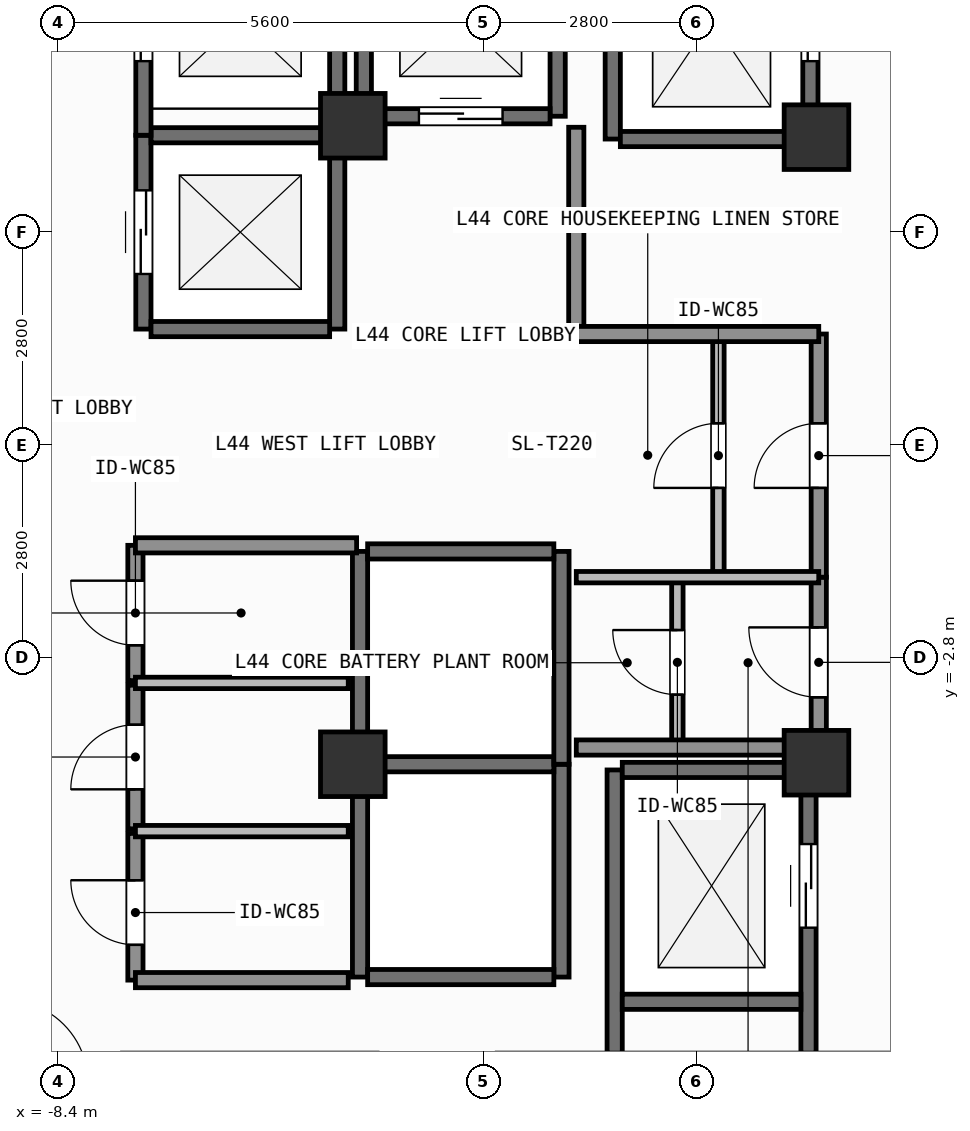
"""IFC4 building model, lengths in metres.
Left out: names, types, materials, properties, quantities, classifications, styles, units other than length and angle.
Written with IfcOpenShell. Run it as: python <this file> out.ifc"""

import sys

from ifc_helpers import new_model, si_unit, direction, frame, frame_2d, origin, origin_2d, place, context, subcontext, project, spatial, rectangle, extrude, element, fill, save


model = new_model("IFC4")
c1 = context("Model", 3, precision=1e-05, world=origin(), true_north=direction((0.0, 1.0)))
c2 = subcontext(c1, "Body", "Model", "MODEL_VIEW")
j1 = project(units=[si_unit("LENGTHUNIT", "METRE"), si_unit("PLANEANGLEUNIT", "RADIAN")], contexts=[c1])
p1 = place(None, origin())
s1 = spatial("IfcSite", under=j1, at=p1, CompositionType="ELEMENT")
p2 = place(p1, origin())
s2 = spatial("IfcBuilding", under=s1, at=p2, CompositionType="ELEMENT")
p3 = place(p2, frame((0.0, 0.0, 179.7)))
s3 = spatial("IfcBuildingStorey", under=s2, at=p3, CompositionType="ELEMENT", Elevation=179.7)
for number, where, z_axis, x_axis in (
    (1, (-4.52, -4.2, 0.0), (0.0, 0.0, 1.0), (1.0, 0.0, 0.0)),
    (2, (1.58, -4.18, 0.0), (0.0, 0.0, 1.0), (1.0, 0.0, 0.0)),
    (3, (1.58, 4.05, 0.0), (0.0, 0.0, 1.0), (1.0, 0.0, 0.0)),
    (4, (-4.52, 4.2, 0.0), (0.0, 0.0, 1.0), (1.0, 0.0, 0.0)),
):
    element("IfcColumn", number, at=place(p3, frame(where, z_axis=z_axis, x_axis=x_axis)), inside=s3, PredefinedType="COLUMN", context=c2, shape_type="SweptSolid", body=[
        extrude(rectangle(XDim=0.85, YDim=0.85, at=origin_2d()), origin(), (0.0, 0.0, 1.0), 3.9),
    ])
p4 = place(p3, frame((-7.275, 1.525, 0.0), z_axis=(0.0, 0.0, 1.0), x_axis=(0.0, 1.0, 0.0)))
e5 = element("IfcWall", 5, at=p4, inside=s3, PredefinedType="SHEAR", context=c2, shape_type="SweptSolid", body=[
    extrude(rectangle(XDim=2.55, YDim=0.2, at=frame_2d((1.275, 0.0))), origin(), (0.0, 0.0, 1.0), 3.68),
])
p5 = place(p4, frame((0.725, 0.0, 0.0)))
e6 = element("IfcOpeningElement", 6, at=p5, cuts=e5, PredefinedType="OPENING", context=c2, shape_type="SweptSolid", body=[
    extrude(rectangle(XDim=1.1, YDim=2.2, at=frame_2d((0.55, 1.1))), frame((0.0, 0.11, 0.0), z_axis=(0.0, -1.0, 0.0), x_axis=(1.0, 0.0, 0.0)), (0.0, 0.0, 1.0), 0.22),
])
p6 = place(p3, frame((-4.725, 1.525, 0.0), z_axis=(0.0, 0.0, 1.0), x_axis=(0.0, 1.0, 0.0)))
e7 = element("IfcWall", 7, at=p6, inside=s3, PredefinedType="SHEAR", context=c2, shape_type="SweptSolid", body=[
    extrude(rectangle(XDim=2.55, YDim=0.2, at=frame_2d((1.275, 0.0))), origin(), (0.0, 0.0, 1.0), 3.68),
])
for number, where, z_axis, x_axis in (
    (8, (-7.175, 1.525, 0.0), (0.0, 0.0, 1.0), (1.0, 0.0, 0.0)),
    (9, (-7.175, 4.075, 0.0), (0.0, 0.0, 1.0), (1.0, 0.0, 0.0)),
):
    element("IfcWall", number, at=place(p3, frame(where, z_axis=z_axis, x_axis=x_axis)), inside=s3, PredefinedType="SHEAR", context=c2, shape_type="SweptSolid", body=[
        extrude(rectangle(XDim=2.35, YDim=0.2, at=frame_2d((1.175, 0.0))), origin(), (0.0, 0.0, 1.0), 3.68),
    ])
p7 = place(p3, frame((-7.275, 4.075, 0.0), z_axis=(0.0, 0.0, 1.0), x_axis=(0.0, 1.0, 0.0)))
e10 = element("IfcWall", 10, at=p7, inside=s3, PredefinedType="SHEAR", context=c2, shape_type="SweptSolid", body=[
    extrude(rectangle(XDim=2.8, YDim=0.2, at=frame_2d((1.4, 0.0))), origin(), (0.0, 0.0, 1.0), 3.68),
])
p8 = place(p7, frame((0.975, 0.0, 0.0)))
e11 = element("IfcOpeningElement", 11, at=p8, cuts=e10, PredefinedType="OPENING", context=c2, shape_type="SweptSolid", body=[
    extrude(rectangle(XDim=1.1, YDim=2.2, at=frame_2d((0.55, 1.1))), frame((0.0, 0.11, 0.0), z_axis=(0.0, -1.0, 0.0), x_axis=(1.0, 0.0, 0.0)), (0.0, 0.0, 1.0), 0.22),
])
p9 = place(p3, frame((-4.725, 4.075, 0.0), z_axis=(0.0, 0.0, 1.0), x_axis=(0.0, 1.0, 0.0)))
e12 = element("IfcWall", 12, at=p9, inside=s3, PredefinedType="SHEAR", context=c2, shape_type="SweptSolid", body=[
    extrude(rectangle(XDim=2.8, YDim=0.2, at=frame_2d((1.4, 0.0))), origin(), (0.0, 0.0, 1.0), 3.68),
])
for number, where, z_axis, x_axis in (
    (13, (-4.375, 4.325, 0.0), (0.0, 0.0, 1.0), (0.0, 1.0, 0.0)),
    (14, (-1.825, 4.325, 0.0), (0.0, 0.0, 1.0), (0.0, 1.0, 0.0)),
):
    element("IfcWall", number, at=place(p3, frame(where, z_axis=z_axis, x_axis=x_axis)), inside=s3, PredefinedType="SHEAR", context=c2, shape_type="SweptSolid", body=[
        extrude(rectangle(XDim=2.55, YDim=0.2, at=frame_2d((1.275, 0.0))), origin(), (0.0, 0.0, 1.0), 3.68),
    ])
p10 = place(p3, frame((-4.275, 4.325, 0.0), z_axis=(0.0, 0.0, 1.0), x_axis=(1.0, 0.0, 0.0)))
e15 = element("IfcWall", 15, at=p10, inside=s3, PredefinedType="SHEAR", context=c2, shape_type="SweptSolid", body=[
    extrude(rectangle(XDim=2.35, YDim=0.2, at=frame_2d((1.175, 0.0))), origin(), (0.0, 0.0, 1.0), 3.68),
])
p11 = place(p10, frame((0.625, 0.0, 0.0)))
e16 = element("IfcOpeningElement", 16, at=p11, cuts=e15, PredefinedType="OPENING", context=c2, shape_type="SweptSolid", body=[
    extrude(rectangle(XDim=1.1, YDim=2.2, at=frame_2d((0.55, 1.1))), frame((0.0, 0.11, 0.0), z_axis=(0.0, -1.0, 0.0), x_axis=(1.0, 0.0, 0.0)), (0.0, 0.0, 1.0), 0.22),
])
for number, where, z_axis, x_axis in (
    (17, (-4.425, -7.0, 0.0), (0.0, 0.0, 1.0), (0.0, 1.0, 0.0)),
    (18, (-1.775, -7.0, 0.0), (0.0, 0.0, 1.0), (0.0, 1.0, 0.0)),
):
    element("IfcWall", number, at=place(p3, frame(where, z_axis=z_axis, x_axis=x_axis)), inside=s3, PredefinedType="SHEAR", context=c2, shape_type="SweptSolid", body=[
        extrude(rectangle(XDim=2.8, YDim=0.2, at=frame_2d((1.4, 0.0))), origin(), (0.0, 0.0, 1.0), 3.68),
    ])
for number, where, z_axis, x_axis in (
    (19, (-4.325, -7.0, 0.0), (0.0, 0.0, 1.0), (1.0, 0.0, 0.0)),
    (20, (-4.325, -4.2, 0.0), (0.0, 0.0, 1.0), (1.0, 0.0, 0.0)),
):
    element("IfcWall", number, at=place(p3, frame(where, z_axis=z_axis, x_axis=x_axis)), inside=s3, PredefinedType="SHEAR", context=c2, shape_type="SweptSolid", body=[
        extrude(rectangle(XDim=2.45, YDim=0.2, at=frame_2d((1.225, 0.0))), origin(), (0.0, 0.0, 1.0), 3.68),
    ])
for number, where, z_axis, x_axis in (
    (21, (-4.425, -4.2, 0.0), (0.0, 0.0, 1.0), (0.0, 1.0, 0.0)),
    (22, (-1.775, -4.2, 0.0), (0.0, 0.0, 1.0), (0.0, 1.0, 0.0)),
):
    element("IfcWall", number, at=place(p3, frame(where, z_axis=z_axis, x_axis=x_axis)), inside=s3, PredefinedType="SHEAR", context=c2, shape_type="SweptSolid", body=[
        extrude(rectangle(XDim=2.8, YDim=0.2, at=frame_2d((1.4, 0.0))), origin(), (0.0, 0.0, 1.0), 3.68),
    ])
p12 = place(p3, frame((-4.325, -1.4, 0.0), z_axis=(0.0, 0.0, 1.0), x_axis=(1.0, 0.0, 0.0)))
e23 = element("IfcWall", 23, at=p12, inside=s3, PredefinedType="SHEAR", context=c2, shape_type="SweptSolid", body=[
    extrude(rectangle(XDim=2.45, YDim=0.2, at=frame_2d((1.225, 0.0))), origin(), (0.0, 0.0, 1.0), 3.68),
])
p13 = place(p3, frame((-1.1, 4.025, 0.0), z_axis=(0.0, 0.0, 1.0), x_axis=(0.0, 1.0, 0.0)))
e24 = element("IfcWall", 24, at=p13, inside=s3, PredefinedType="SHEAR", context=c2, shape_type="SweptSolid", body=[
    extrude(rectangle(XDim=3.15, YDim=0.2, at=frame_2d((1.575, 0.0))), origin(), (0.0, 0.0, 1.0), 3.68),
])
p14 = place(p3, frame((1.5, 4.025, 0.0), z_axis=(0.0, 0.0, 1.0), x_axis=(0.0, 1.0, 0.0)))
e25 = element("IfcWall", 25, at=p14, inside=s3, PredefinedType="SHEAR", context=c2, shape_type="SweptSolid", body=[
    extrude(rectangle(XDim=3.15, YDim=0.2, at=frame_2d((1.575, 0.0))), origin(), (0.0, 0.0, 1.0), 3.68),
])
p15 = place(p14, frame((1.025, 0.0, 0.0)))
e26 = element("IfcOpeningElement", 26, at=p15, cuts=e25, PredefinedType="OPENING", context=c2, shape_type="SweptSolid", body=[
    extrude(rectangle(XDim=1.1, YDim=2.2, at=frame_2d((0.55, 1.1))), frame((0.0, 0.11, 0.0), z_axis=(0.0, -1.0, 0.0), x_axis=(1.0, 0.0, 0.0)), (0.0, 0.0, 1.0), 0.22),
])
p16 = place(p3, frame((-1.0, 4.025, 0.0), z_axis=(0.0, 0.0, 1.0), x_axis=(1.0, 0.0, 0.0)))
e27 = element("IfcWall", 27, at=p16, inside=s3, PredefinedType="SHEAR", context=c2, shape_type="SweptSolid", body=[
    extrude(rectangle(XDim=2.4, YDim=0.2, at=frame_2d((1.2, 0.0))), origin(), (0.0, 0.0, 1.0), 3.68),
])
p17 = place(p3, frame((-1.075, -8.0, 0.0), z_axis=(0.0, 0.0, 1.0), x_axis=(0.0, 1.0, 0.0)))
e28 = element("IfcWall", 28, at=p17, inside=s3, PredefinedType="SHEAR", context=c2, shape_type="SweptSolid", body=[
    extrude(rectangle(XDim=3.725, YDim=0.2, at=frame_2d((1.863, 0.0))), origin(), (0.0, 0.0, 1.0), 3.68),
])
p18 = place(p3, frame((1.475, -8.0, 0.0), z_axis=(0.0, 0.0, 1.0), x_axis=(0.0, 1.0, 0.0)))
e29 = element("IfcWall", 29, at=p18, inside=s3, PredefinedType="SHEAR", context=c2, shape_type="SweptSolid", body=[
    extrude(rectangle(XDim=3.725, YDim=0.2, at=frame_2d((1.863, 0.0))), origin(), (0.0, 0.0, 1.0), 3.68),
])
p19 = place(p18, frame((1.65, 0.0, 0.0)))
e30 = element("IfcOpeningElement", 30, at=p19, cuts=e29, PredefinedType="OPENING", context=c2, shape_type="SweptSolid", body=[
    extrude(rectangle(XDim=1.1, YDim=2.2, at=frame_2d((0.55, 1.1))), frame((0.0, 0.11, 0.0), z_axis=(0.0, -1.0, 0.0), x_axis=(1.0, 0.0, 0.0)), (0.0, 0.0, 1.0), 0.22),
])
for number, where, z_axis, x_axis in (
    (31, (-0.975, -7.325, 0.0), (0.0, 0.0, 1.0), (1.0, 0.0, 0.0)),
    (32, (-0.975, -4.275, 0.0), (0.0, 0.0, 1.0), (1.0, 0.0, 0.0)),
):
    element("IfcWall", number, at=place(p3, frame(where, z_axis=z_axis, x_axis=x_axis)), inside=s3, PredefinedType="SHEAR", context=c2, shape_type="SweptSolid", body=[
        extrude(rectangle(XDim=2.35, YDim=0.2, at=frame_2d((1.175, 0.0))), origin(), (0.0, 0.0, 1.0), 3.68),
    ])
p20 = place(p3, frame((-0.25, -3.98, 0.0), z_axis=(0.0, 0.0, 1.0), x_axis=(0.0, 1.0, 0.0)))
e33 = element("IfcWall", 33, at=p20, inside=s3, PredefinedType="PARTITIONING", context=c2, shape_type="SweptSolid", body=[
    extrude(rectangle(XDim=2.241, YDim=0.15, at=frame_2d((1.121, 0.0))), origin(), (0.0, 0.0, 1.0), 3.68),
])
p21 = place(p20, frame((0.696, 0.0, 0.0)))
e34 = element("IfcOpeningElement", 34, at=p21, cuts=e33, PredefinedType="OPENING", context=c2, shape_type="SweptSolid", body=[
    extrude(rectangle(XDim=0.85, YDim=2.1, at=frame_2d((0.425, 1.05))), frame((0.0, 0.085, 0.0), z_axis=(0.0, -1.0, 0.0), x_axis=(1.0, 0.0, 0.0)), (0.0, 0.0, 1.0), 0.17),
])
p22 = place(p3, frame((0.29, -1.739, 0.0), z_axis=(0.0, 0.0, 1.0), x_axis=(0.0, 1.0, 0.0)))
e35 = element("IfcWall", 35, at=p22, inside=s3, PredefinedType="PARTITIONING", context=c2, shape_type="SweptSolid", body=[
    extrude(rectangle(XDim=3.199, YDim=0.15, at=frame_2d((1.6, 0.0))), origin(), (0.0, 0.0, 1.0), 3.68),
])
p23 = place(p22, frame((1.175, 0.0, 0.0)))
e36 = element("IfcOpeningElement", 36, at=p23, cuts=e35, PredefinedType="OPENING", context=c2, shape_type="SweptSolid", body=[
    extrude(rectangle(XDim=0.85, YDim=2.1, at=frame_2d((0.425, 1.05))), frame((0.0, 0.085, 0.0), z_axis=(0.0, -1.0, 0.0), x_axis=(1.0, 0.0, 0.0)), (0.0, 0.0, 1.0), 0.17),
])
p24 = place(p3, frame((1.61, -3.98, 0.0), z_axis=(0.0, 0.0, 1.0), x_axis=(0.0, 1.0, 0.0)))
e37 = element("IfcWall", 37, at=p24, inside=s3, PredefinedType="SOLIDWALL", context=c2, shape_type="SweptSolid", body=[
    extrude(rectangle(XDim=2.241, YDim=0.2, at=frame_2d((1.121, 0.0))), origin(), (0.0, 0.0, 1.0), 3.68),
])
p25 = place(p24, frame((0.66, 0.0, 0.0)))
e38 = element("IfcOpeningElement", 38, at=p25, cuts=e37, PredefinedType="OPENING", context=c2, shape_type="SweptSolid", body=[
    extrude(rectangle(XDim=0.92, YDim=2.1, at=frame_2d((0.46, 1.05))), frame((0.0, 0.11, 0.0), z_axis=(0.0, -1.0, 0.0), x_axis=(1.0, 0.0, 0.0)), (0.0, 0.0, 1.0), 0.22),
])
p26 = place(p3, frame((1.61, -1.739, 0.0), z_axis=(0.0, 0.0, 1.0), x_axis=(0.0, 1.0, 0.0)))
e39 = element("IfcWall", 39, at=p26, inside=s3, PredefinedType="SOLIDWALL", context=c2, shape_type="SweptSolid", body=[
    extrude(rectangle(XDim=3.199, YDim=0.2, at=frame_2d((1.6, 0.0))), origin(), (0.0, 0.0, 1.0), 3.68),
])
p27 = place(p26, frame((1.175, 0.0, 0.0)))
e40 = element("IfcOpeningElement", 40, at=p27, cuts=e39, PredefinedType="OPENING", context=c2, shape_type="SweptSolid", body=[
    extrude(rectangle(XDim=0.85, YDim=2.1, at=frame_2d((0.425, 1.05))), frame((0.0, 0.11, 0.0), z_axis=(0.0, -1.0, 0.0), x_axis=(1.0, 0.0, 0.0)), (0.0, 0.0, 1.0), 0.22),
])
p28 = place(p3, frame((-7.38, -7.04, 0.0), z_axis=(0.0, 0.0, 1.0), x_axis=(0.0, 1.0, 0.0)))
e41 = element("IfcWall", 41, at=p28, inside=s3, PredefinedType="SOLIDWALL", context=c2, shape_type="SweptSolid", body=[
    extrude(rectangle(XDim=1.93, YDim=0.2, at=frame_2d((0.965, 0.0))), origin(), (0.0, 0.0, 1.0), 3.68),
])
p29 = place(p28, frame((0.464, 0.0, 0.0)))
e42 = element("IfcOpeningElement", 42, at=p29, cuts=e41, PredefinedType="OPENING", context=c2, shape_type="SweptSolid", body=[
    extrude(rectangle(XDim=0.85, YDim=2.1, at=frame_2d((0.425, 1.05))), frame((0.0, 0.11, 0.0), z_axis=(0.0, -1.0, 0.0), x_axis=(1.0, 0.0, 0.0)), (0.0, 0.0, 1.0), 0.22),
])
p30 = place(p3, frame((-7.38, -5.05, 0.0), z_axis=(0.0, 0.0, 1.0), x_axis=(0.0, 1.0, 0.0)))
e43 = element("IfcWall", 43, at=p30, inside=s3, PredefinedType="SOLIDWALL", context=c2, shape_type="SweptSolid", body=[
    extrude(rectangle(XDim=1.89, YDim=0.2, at=frame_2d((0.945, 0.0))), origin(), (0.0, 0.0, 1.0), 3.68),
])
p31 = place(p30, frame((0.52, 0.0, 0.0)))
e44 = element("IfcOpeningElement", 44, at=p31, cuts=e43, PredefinedType="OPENING", context=c2, shape_type="SweptSolid", body=[
    extrude(rectangle(XDim=0.85, YDim=2.1, at=frame_2d((0.425, 1.05))), frame((0.0, 0.11, 0.0), z_axis=(0.0, -1.0, 0.0), x_axis=(1.0, 0.0, 0.0)), (0.0, 0.0, 1.0), 0.22),
])
p32 = place(p3, frame((-7.38, -3.1, 0.0), z_axis=(0.0, 0.0, 1.0), x_axis=(0.0, 1.0, 0.0)))
e45 = element("IfcWall", 45, at=p32, inside=s3, PredefinedType="SOLIDWALL", context=c2, shape_type="SweptSolid", body=[
    extrude(rectangle(XDim=1.78, YDim=0.2, at=frame_2d((0.89, 0.0))), origin(), (0.0, 0.0, 1.0), 3.68),
])
p33 = place(p32, frame((0.465, 0.0, 0.0)))
e46 = element("IfcOpeningElement", 46, at=p33, cuts=e45, PredefinedType="OPENING", context=c2, shape_type="SweptSolid", body=[
    extrude(rectangle(XDim=0.85, YDim=2.1, at=frame_2d((0.425, 1.05))), frame((0.0, 0.11, 0.0), z_axis=(0.0, -1.0, 0.0), x_axis=(1.0, 0.0, 0.0)), (0.0, 0.0, 1.0), 0.22),
])
p34 = place(p3, frame((-7.38, -1.32, 0.0), z_axis=(0.0, 0.0, 1.0), x_axis=(1.0, 0.0, 0.0)))
e47 = element("IfcWall", 47, at=p34, inside=s3, PredefinedType="SOLIDWALL", context=c2, shape_type="SweptSolid", body=[
    extrude(rectangle(XDim=2.91, YDim=0.2, at=frame_2d((1.455, 0.0))), origin(), (0.0, 0.0, 1.0), 3.68),
])
p35 = place(p3, frame((-1.58, 1.48, 0.0), z_axis=(0.0, 0.0, 1.0), x_axis=(0.0, 1.0, 0.0)))
e48 = element("IfcWall", 48, at=p35, inside=s3, PredefinedType="SOLIDWALL", context=c2, shape_type="SweptSolid", body=[
    extrude(rectangle(XDim=2.7, YDim=0.2, at=frame_2d((1.35, 0.0))), origin(), (0.0, 0.0, 1.0), 3.68),
])
for number, where, z_axis, x_axis in (
    (49, (-1.58, -3.98, 0.0), (0.0, 0.0, 1.0), (1.0, 0.0, 0.0)),
    (50, (-1.58, 1.46, 0.0), (0.0, 0.0, 1.0), (1.0, 0.0, 0.0)),
):
    element("IfcWall", number, at=place(p3, frame(where, z_axis=z_axis, x_axis=x_axis)), inside=s3, PredefinedType="SOLIDWALL", context=c2, shape_type="SweptSolid", body=[
        extrude(rectangle(XDim=3.19, YDim=0.2, at=frame_2d((1.595, 0.0))), origin(), (0.0, 0.0, 1.0), 3.68),
    ])
p36 = place(p3, frame((-1.58, -1.739, 0.0), z_axis=(0.0, 0.0, 1.0), x_axis=(1.0, 0.0, 0.0)))
e51 = element("IfcWall", 51, at=p36, inside=s3, PredefinedType="PARTITIONING", context=c2, shape_type="SweptSolid", body=[
    extrude(rectangle(XDim=3.19, YDim=0.15, at=frame_2d((1.595, 0.0))), origin(), (0.0, 0.0, 1.0), 3.68),
])
p37 = place(p3, frame((-7.38, -7.04, 0.0), z_axis=(0.0, 0.0, 1.0), x_axis=(1.0, 0.0, 0.0)))
e52 = element("IfcWall", 52, at=p37, inside=s3, PredefinedType="SOLIDWALL", context=c2, shape_type="SweptSolid", body=[
    extrude(rectangle(XDim=2.8, YDim=0.2, at=frame_2d((1.4, 0.0))), origin(), (0.0, 0.0, 1.0), 3.68),
])
for number, where, z_axis, x_axis in (
    (53, (-7.38, -5.08, 0.0), (0.0, 0.0, 1.0), (1.0, 0.0, 0.0)),
    (54, (-7.38, -3.13, 0.0), (0.0, 0.0, 1.0), (1.0, 0.0, 0.0)),
):
    element("IfcWall", number, at=place(p3, frame(where, z_axis=z_axis, x_axis=x_axis)), inside=s3, PredefinedType="PARTITIONING", context=c2, shape_type="SweptSolid", body=[
        extrude(rectangle(XDim=2.8, YDim=0.15, at=frame_2d((1.4, 0.0))), origin(), (0.0, 0.0, 1.0), 3.68),
    ])
p38 = place(p5, origin())
e55 = element("IfcDoor", 55, at=p38, inside=s3, OperationType="SLIDING_TO_LEFT", PredefinedType="DOOR", context=c2, shape_type="SweptSolid", body=[
    extrude(rectangle(XDim=1.1, YDim=2.2, at=frame_2d((0.55, 1.1))), frame((0.0, 0.025, 0.0), z_axis=(0.0, -1.0, 0.0), x_axis=(1.0, 0.0, 0.0)), (0.0, 0.0, 1.0), 0.05),
])
fill(e6, e55)
p39 = place(p8, origin())
e56 = element("IfcDoor", 56, at=p39, inside=s3, OperationType="SLIDING_TO_LEFT", PredefinedType="DOOR", context=c2, shape_type="SweptSolid", body=[
    extrude(rectangle(XDim=1.1, YDim=2.2, at=frame_2d((0.55, 1.1))), frame((0.0, 0.025, 0.0), z_axis=(0.0, -1.0, 0.0), x_axis=(1.0, 0.0, 0.0)), (0.0, 0.0, 1.0), 0.05),
])
fill(e11, e56)
p40 = place(p11, origin())
e57 = element("IfcDoor", 57, at=p40, inside=s3, OperationType="SLIDING_TO_LEFT", PredefinedType="DOOR", context=c2, shape_type="SweptSolid", body=[
    extrude(rectangle(XDim=1.1, YDim=2.2, at=frame_2d((0.55, 1.1))), frame((0.0, 0.025, 0.0), z_axis=(0.0, -1.0, 0.0), x_axis=(1.0, 0.0, 0.0)), (0.0, 0.0, 1.0), 0.05),
])
fill(e16, e57)
p41 = place(p15, origin())
e58 = element("IfcDoor", 58, at=p41, inside=s3, OperationType="SLIDING_TO_LEFT", PredefinedType="DOOR", context=c2, shape_type="SweptSolid", body=[
    extrude(rectangle(XDim=1.1, YDim=2.2, at=frame_2d((0.55, 1.1))), frame((0.0, 0.025, 0.0), z_axis=(0.0, -1.0, 0.0), x_axis=(1.0, 0.0, 0.0)), (0.0, 0.0, 1.0), 0.05),
])
fill(e26, e58)
p42 = place(p19, origin())
e59 = element("IfcDoor", 59, at=p42, inside=s3, OperationType="SLIDING_TO_LEFT", PredefinedType="DOOR", context=c2, shape_type="SweptSolid", body=[
    extrude(rectangle(XDim=1.1, YDim=2.2, at=frame_2d((0.55, 1.1))), frame((0.0, 0.025, 0.0), z_axis=(0.0, -1.0, 0.0), x_axis=(1.0, 0.0, 0.0)), (0.0, 0.0, 1.0), 0.05),
])
fill(e30, e59)
p43 = place(p21, origin())
e60 = element("IfcDoor", 60, at=p43, inside=s3, OperationType="SINGLE_SWING_RIGHT", PredefinedType="DOOR", context=c2, shape_type="SweptSolid", body=[
    extrude(rectangle(XDim=0.85, YDim=2.1, at=frame_2d((0.425, 1.05))), frame((0.0, 0.025, 0.0), z_axis=(0.0, -1.0, 0.0), x_axis=(1.0, 0.0, 0.0)), (0.0, 0.0, 1.0), 0.05),
])
fill(e34, e60)
p44 = place(p23, origin())
e61 = element("IfcDoor", 61, at=p44, inside=s3, OperationType="SINGLE_SWING_LEFT", PredefinedType="DOOR", context=c2, shape_type="SweptSolid", body=[
    extrude(rectangle(XDim=0.85, YDim=2.1, at=frame_2d((0.425, 1.05))), frame((0.0, 0.025, 0.0), z_axis=(0.0, -1.0, 0.0), x_axis=(1.0, 0.0, 0.0)), (0.0, 0.0, 1.0), 0.05),
])
fill(e36, e61)
p45 = place(p25, origin())
e62 = element("IfcDoor", 62, at=p45, inside=s3, OperationType="SINGLE_SWING_RIGHT", PredefinedType="DOOR", context=c2, shape_type="SweptSolid", body=[
    extrude(rectangle(XDim=0.92, YDim=2.1, at=frame_2d((0.46, 1.05))), frame((0.0, 0.025, 0.0), z_axis=(0.0, -1.0, 0.0), x_axis=(1.0, 0.0, 0.0)), (0.0, 0.0, 1.0), 0.05),
])
fill(e38, e62)
p46 = place(p27, origin())
e63 = element("IfcDoor", 63, at=p46, inside=s3, OperationType="SINGLE_SWING_LEFT", PredefinedType="DOOR", context=c2, shape_type="SweptSolid", body=[
    extrude(rectangle(XDim=0.85, YDim=2.1, at=frame_2d((0.425, 1.05))), frame((0.0, 0.025, 0.0), z_axis=(0.0, -1.0, 0.0), x_axis=(1.0, 0.0, 0.0)), (0.0, 0.0, 1.0), 0.05),
])
fill(e40, e63)
p47 = place(p29, origin())
e64 = element("IfcDoor", 64, at=p47, inside=s3, OperationType="SINGLE_SWING_RIGHT", PredefinedType="DOOR", context=c2, shape_type="SweptSolid", body=[
    extrude(rectangle(XDim=0.85, YDim=2.1, at=frame_2d((0.425, 1.05))), frame((0.0, 0.025, 0.0), z_axis=(0.0, -1.0, 0.0), x_axis=(1.0, 0.0, 0.0)), (0.0, 0.0, 1.0), 0.05),
])
fill(e42, e64)
p48 = place(p31, origin())
e65 = element("IfcDoor", 65, at=p48, inside=s3, OperationType="SINGLE_SWING_LEFT", PredefinedType="DOOR", context=c2, shape_type="SweptSolid", body=[
    extrude(rectangle(XDim=0.85, YDim=2.1, at=frame_2d((0.425, 1.05))), frame((0.0, 0.025, 0.0), z_axis=(0.0, -1.0, 0.0), x_axis=(1.0, 0.0, 0.0)), (0.0, 0.0, 1.0), 0.05),
])
fill(e44, e65)
p49 = place(p33, origin())
e66 = element("IfcDoor", 66, at=p49, inside=s3, OperationType="SINGLE_SWING_RIGHT", PredefinedType="DOOR", context=c2, shape_type="SweptSolid", body=[
    extrude(rectangle(XDim=0.85, YDim=2.1, at=frame_2d((0.425, 1.05))), frame((0.0, 0.025, 0.0), z_axis=(0.0, -1.0, 0.0), x_axis=(1.0, 0.0, 0.0)), (0.0, 0.0, 1.0), 0.05),
])
fill(e46, e66)
save(model, sys.argv[1])
